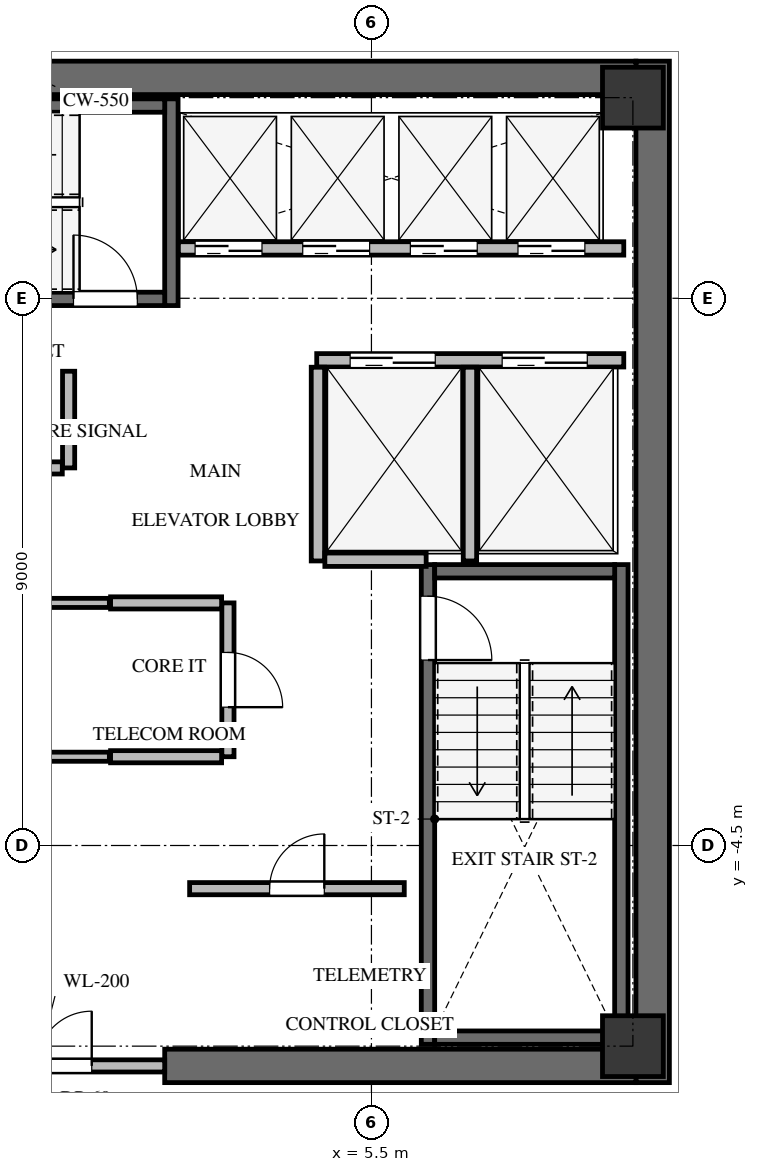
"""IFC4 building model, lengths in metres.
Left out: names, types, materials, properties, quantities, classifications, styles, units other than length and angle.
Written with IfcOpenShell. Run it as: python <this file> out.ifc"""

import sys

from ifc_helpers import new_model, si_unit, direction, frame, frame_2d, origin, origin_2d, place, context, subcontext, project, spatial, rectangle, extrude, source, transform, mapped, element, fill, save


model = new_model("IFC4")
c1 = context("Model", 3, precision=1e-05, world=origin(), true_north=direction((0.0, 1.0)))
c2 = subcontext(c1, "Body", "Model", "MODEL_VIEW")
j1 = project(units=[si_unit("LENGTHUNIT", "METRE"), si_unit("PLANEANGLEUNIT", "RADIAN")], contexts=[c1])
p1 = place(None, origin())
s1 = spatial("IfcSite", under=j1, at=p1, CompositionType="ELEMENT")
p2 = place(p1, origin())
s2 = spatial("IfcBuilding", under=s1, at=p2, CompositionType="ELEMENT")
p3 = place(p2, frame((0.0, 0.0, 248.0)))
s3 = spatial("IfcBuildingStorey", under=s2, at=p3, CompositionType="ELEMENT", Elevation=248.0)
p4 = place(p3, frame((10.125, -8.4, 0.0), z_axis=(0.0, 0.0, 1.0), x_axis=(0.0, 1.0, 0.0)))
e1 = element("IfcWall", 1, at=p4, inside=s3, PredefinedType="SHEAR", context=c2, shape_type="SweptSolid", body=[
    extrude(rectangle(XDim=16.8, YDim=0.55, at=frame_2d((8.4, 0.0))), origin(), (0.0, 0.0, 1.0), 3.3),
])
p5 = place(p3, frame((2.1, -8.125, 0.0), z_axis=(0.0, 0.0, 1.0), x_axis=(1.0, 0.0, 0.0)))
e2 = element("IfcWall", 2, at=p5, inside=s3, PredefinedType="SHEAR", context=c2, shape_type="SweptSolid", body=[
    extrude(rectangle(XDim=7.75, YDim=0.55, at=frame_2d((3.875, 0.0))), origin(), (0.0, 0.0, 1.0), 3.3),
])
p6 = place(p3, frame((-9.85, 8.125, 0.0), z_axis=(0.0, 0.0, 1.0), x_axis=(1.0, 0.0, 0.0)))
e3 = element("IfcWall", 3, at=p6, inside=s3, PredefinedType="SHEAR", context=c2, shape_type="SweptSolid", body=[
    extrude(rectangle(XDim=19.7, YDim=0.55, at=frame_2d((9.85, 0.0))), origin(), (0.0, 0.0, 1.0), 3.3),
])
p7 = place(p3, frame((9.61, -7.77, -0.24), z_axis=(0.0, 0.0, 1.0), x_axis=(0.0, 1.0, 0.0)))
e4 = element("IfcWall", 4, at=p7, inside=s3, PredefinedType="SHEAR", context=c2, shape_type="SweptSolid", body=[
    extrude(rectangle(XDim=7.89, YDim=0.22, at=frame_2d((3.945, 0.0))), origin(), (0.0, 0.0, 1.0), 3.3),
])
p8 = place(p3, frame((6.43, 0.12, -0.24), z_axis=(0.0, 0.0, 1.0), x_axis=(0.0, -1.0, 0.0)))
e5 = element("IfcWall", 5, at=p8, inside=s3, PredefinedType="SHEAR", context=c2, shape_type="SweptSolid", body=[
    extrude(rectangle(XDim=7.89, YDim=0.22, at=frame_2d((3.945, 0.0))), origin(), (0.0, 0.0, 1.0), 3.3),
])
p9 = place(p8, frame((0.52, 0.0, 0.0)))
e6 = element("IfcOpeningElement", 6, at=p9, cuts=e5, PredefinedType="OPENING", context=c2, shape_type="SweptSolid", body=[
    extrude(rectangle(XDim=1.05, YDim=2.15, at=frame_2d((0.525, 1.075))), frame((0.0, 0.12, 0.0), z_axis=(0.0, -1.0, 0.0), x_axis=(1.0, 0.0, 0.0)), (0.0, 0.0, 1.0), 0.24),
])
for number, where, z_axis, x_axis in (
    (7, (6.54, -7.66, -0.24), (0.0, 0.0, 1.0), (1.0, 0.0, 0.0)),
    (8, (9.5, 0.01, -0.24), (0.0, 0.0, 1.0), (-1.0, 0.0, 0.0)),
):
    element("IfcWall", number, at=place(p3, frame(where, z_axis=z_axis, x_axis=x_axis)), inside=s3, PredefinedType="SHEAR", context=c2, shape_type="SweptSolid", body=[
        extrude(rectangle(XDim=2.96, YDim=0.22, at=frame_2d((1.48, 0.0))), origin(), (0.0, 0.0, 1.0), 3.3),
    ])
p10 = place(p3, frame((2.21, 4.38, -0.24), z_axis=(0.0, 0.0, 1.0), x_axis=(0.0, 1.0, 0.0)))
e9 = element("IfcWall", 9, at=p10, inside=s3, PredefinedType="SHEAR", context=c2, shape_type="SweptSolid", body=[
    extrude(rectangle(XDim=3.4, YDim=0.22, at=frame_2d((1.7, 0.0))), origin(), (0.0, 0.0, 1.0), 3.3),
])
p11 = place(p3, frame((-5.25, 4.49, -0.24), z_axis=(0.0, 0.0, 1.0), x_axis=(1.0, 0.0, 0.0)))
e10 = element("IfcWall", 10, at=p11, inside=s3, PredefinedType="SHEAR", context=c2, shape_type="SweptSolid", body=[
    extrude(rectangle(XDim=7.35, YDim=0.22, at=frame_2d((3.675, 0.0))), origin(), (0.0, 0.0, 1.0), 3.3),
])
p12 = place(p11, frame((5.85, 0.0, 0.0)))
e11 = element("IfcOpeningElement", 11, at=p12, cuts=e10, PredefinedType="OPENING", context=c2, shape_type="SweptSolid", body=[
    extrude(rectangle(XDim=1.05, YDim=2.15, at=frame_2d((0.525, 1.075))), frame((0.0, 0.12, 0.0), z_axis=(0.0, -1.0, 0.0), x_axis=(1.0, 0.0, 0.0)), (0.0, 0.0, 1.0), 0.24),
])
p13 = place(p3, frame((2.1, 7.67, -0.24), z_axis=(0.0, 0.0, 1.0), x_axis=(-1.0, 0.0, 0.0)))
e12 = element("IfcWall", 12, at=p13, inside=s3, PredefinedType="SHEAR", context=c2, shape_type="SweptSolid", body=[
    extrude(rectangle(XDim=7.35, YDim=0.22, at=frame_2d((3.675, 0.0))), origin(), (0.0, 0.0, 1.0), 3.3),
])
m1 = source(origin(), c2, "Body", "SweptSolid", [
    extrude(rectangle(XDim=1.0, YDim=1.0, at=origin_2d()), origin(), (0.0, 0.0, 1.0), 3.3),
])
for number, where, z_axis, x_axis in (
    (13, (9.8, -7.8, -0.24), (0.0, 0.0, 1.0), (1.0, 0.0, 0.0)),
    (14, (9.8, 7.8, -0.24), (0.0, 0.0, 1.0), (1.0, 0.0, 0.0)),
):
    element("IfcColumn", number, at=place(p3, frame(where, z_axis=z_axis, x_axis=x_axis)), inside=s3, PredefinedType="COLUMN", context=c2, shape_type="MappedRepresentation", body=[
        mapped(m1, transform((0.0, 0.0, 0.0), x_axis=(1.0, 0.0, 0.0), y_axis=(0.0, 1.0, 0.0), z_axis=(0.0, 0.0, 1.0), scale=1.0)),
    ])
p14 = place(p3, frame((-2.1, -8.125, 0.0), z_axis=(0.0, 0.0, 1.0), x_axis=(1.0, 0.0, 0.0)))
e15 = element("IfcWall", 15, at=p14, inside=s3, PredefinedType="SOLIDWALL", context=c2, shape_type="SweptSolid", body=[
    extrude(rectangle(XDim=4.2, YDim=0.2, at=frame_2d((2.1, 0.0))), origin(), (0.0, 0.0, 1.0), 3.045),
])
p15 = place(p14, frame((1.2, 0.0, 0.0)))
e16 = element("IfcOpeningElement", 16, at=p15, cuts=e15, PredefinedType="OPENING", context=c2, shape_type="SweptSolid", body=[
    extrude(rectangle(XDim=1.8, YDim=2.15, at=frame_2d((0.9, 1.075))), frame((0.0, 0.11, 0.0), z_axis=(0.0, -1.0, 0.0), x_axis=(1.0, 0.0, 0.0)), (0.0, 0.0, 1.0), 0.22),
])
p16 = place(p3, frame((4.6, 3.48, 0.0), z_axis=(0.0, 0.0, 1.0), x_axis=(1.0, 0.0, 0.0)))
e17 = element("IfcWall", 17, at=p16, inside=s3, PredefinedType="SOLIDWALL", context=c2, shape_type="SweptSolid", body=[
    extrude(rectangle(XDim=5.05, YDim=0.22, at=frame_2d((2.525, 0.0))), origin(), (0.0, 0.0, 1.0), 3.045),
])
p17 = place(p16, frame((0.55, 0.0, 0.0)))
e18 = element("IfcOpeningElement", 18, at=p17, cuts=e17, PredefinedType="OPENING", context=c2, shape_type="SweptSolid", body=[
    extrude(rectangle(XDim=1.4, YDim=2.15, at=frame_2d((0.7, 1.075))), frame((0.0, 0.12, 0.0), z_axis=(0.0, -1.0, 0.0), x_axis=(1.0, 0.0, 0.0)), (0.0, 0.0, 1.0), 0.24),
])
p18 = place(p16, frame((3.05, 0.0, 0.0)))
e19 = element("IfcOpeningElement", 19, at=p18, cuts=e17, PredefinedType="OPENING", context=c2, shape_type="SweptSolid", body=[
    extrude(rectangle(XDim=1.4, YDim=2.15, at=frame_2d((0.7, 1.075))), frame((0.0, 0.12, 0.0), z_axis=(0.0, -1.0, 0.0), x_axis=(1.0, 0.0, 0.0)), (0.0, 0.0, 1.0), 0.24),
])
for number, where, z_axis, x_axis in (
    (20, (4.62, 0.18, 0.0), (0.0, 0.0, 1.0), (0.0, 1.0, 0.0)),
    (21, (7.12, 0.18, 0.0), (0.0, 0.0, 1.0), (0.0, 1.0, 0.0)),
):
    element("IfcWall", number, at=place(p3, frame(where, z_axis=z_axis, x_axis=x_axis)), inside=s3, PredefinedType="SOLIDWALL", context=c2, shape_type="SweptSolid", body=[
        extrude(rectangle(XDim=3.186, YDim=0.22, at=frame_2d((1.593, 0.0))), origin(), (0.0, 0.0, 1.0), 3.045),
    ])
p19 = place(p3, frame((4.734, 0.2, 0.0), z_axis=(0.0, 0.0, 1.0), x_axis=(1.0, 0.0, 0.0)))
e22 = element("IfcWall", 22, at=p19, inside=s3, PredefinedType="SOLIDWALL", context=c2, shape_type="SweptSolid", body=[
    extrude(rectangle(XDim=1.666, YDim=0.22, at=frame_2d((0.833, 0.0))), origin(), (0.0, 0.0, 1.0), 3.045),
])
p20 = place(p3, frame((2.325, 5.32, 0.0), z_axis=(0.0, 0.0, 1.0), x_axis=(1.0, 0.0, 0.0)))
e23 = element("IfcWall", 23, at=p20, inside=s3, PredefinedType="SOLIDWALL", context=c2, shape_type="SweptSolid", body=[
    extrude(rectangle(XDim=7.325, YDim=0.22, at=frame_2d((3.663, 0.0))), origin(), (0.0, 0.0, 1.0), 3.045),
])
p21 = place(p20, frame((0.275, 0.0, 0.0)))
e24 = element("IfcOpeningElement", 24, at=p21, cuts=e23, PredefinedType="OPENING", context=c2, shape_type="SweptSolid", body=[
    extrude(rectangle(XDim=1.1, YDim=2.15, at=frame_2d((0.55, 1.075))), frame((0.0, 0.12, 0.0), z_axis=(0.0, -1.0, 0.0), x_axis=(1.0, 0.0, 0.0)), (0.0, 0.0, 1.0), 0.24),
])
p22 = place(p20, frame((2.045, 0.0, 0.0)))
e25 = element("IfcOpeningElement", 25, at=p22, cuts=e23, PredefinedType="OPENING", context=c2, shape_type="SweptSolid", body=[
    extrude(rectangle(XDim=1.1, YDim=2.15, at=frame_2d((0.55, 1.075))), frame((0.0, 0.12, 0.0), z_axis=(0.0, -1.0, 0.0), x_axis=(1.0, 0.0, 0.0)), (0.0, 0.0, 1.0), 0.24),
])
p23 = place(p20, frame((3.815, 0.0, 0.0)))
e26 = element("IfcOpeningElement", 26, at=p23, cuts=e23, PredefinedType="OPENING", context=c2, shape_type="SweptSolid", body=[
    extrude(rectangle(XDim=1.1, YDim=2.15, at=frame_2d((0.55, 1.075))), frame((0.0, 0.12, 0.0), z_axis=(0.0, -1.0, 0.0), x_axis=(1.0, 0.0, 0.0)), (0.0, 0.0, 1.0), 0.24),
])
p24 = place(p20, frame((5.585, 0.0, 0.0)))
e27 = element("IfcOpeningElement", 27, at=p24, cuts=e23, PredefinedType="OPENING", context=c2, shape_type="SweptSolid", body=[
    extrude(rectangle(XDim=1.1, YDim=2.15, at=frame_2d((0.55, 1.075))), frame((0.0, 0.12, 0.0), z_axis=(0.0, -1.0, 0.0), x_axis=(1.0, 0.0, 0.0)), (0.0, 0.0, 1.0), 0.24),
])
p25 = place(p3, frame((2.51, -5.21, 0.0), z_axis=(0.0, 0.0, 1.0), x_axis=(1.0, 0.0, 0.0)))
e28 = element("IfcWall", 28, at=p25, inside=s3, PredefinedType="SOLIDWALL", context=c2, shape_type="SweptSolid", body=[
    extrude(rectangle(XDim=3.53, YDim=0.2, at=frame_2d((1.765, 0.0))), origin(), (0.0, 0.0, 1.0), 3.045),
])
p26 = place(p25, frame((1.315, 0.0, 0.0)))
e29 = element("IfcOpeningElement", 29, at=p26, cuts=e28, PredefinedType="OPENING", context=c2, shape_type="SweptSolid", body=[
    extrude(rectangle(XDim=0.9, YDim=2.05, at=frame_2d((0.45, 1.025))), frame((0.0, 0.11, 0.0), z_axis=(0.0, -1.0, 0.0), x_axis=(1.0, 0.0, 0.0)), (0.0, 0.0, 1.0), 0.22),
])
p27 = place(p3, frame((1.19, -3.04, 0.0), z_axis=(0.0, 0.0, 1.0), x_axis=(-1.0, 0.0, 0.0)))
e30 = element("IfcWall", 30, at=p27, inside=s3, PredefinedType="PARTITIONING", context=c2, shape_type="SweptSolid", body=[
    extrude(rectangle(XDim=5.53, YDim=0.15, at=frame_2d((2.765, 0.0))), origin(), (0.0, 0.0, 1.0), 3.045),
])
p28 = place(p27, frame((2.315, 0.0, 0.0)))
e31 = element("IfcOpeningElement", 31, at=p28, cuts=e30, PredefinedType="OPENING", context=c2, shape_type="SweptSolid", body=[
    extrude(rectangle(XDim=0.9, YDim=2.05, at=frame_2d((0.45, 1.025))), frame((0.0, 0.085, 0.0), z_axis=(0.0, -1.0, 0.0), x_axis=(1.0, 0.0, 0.0)), (0.0, 0.0, 1.0), 0.17),
])
p29 = place(p3, frame((-4.34, -0.51, 0.0), z_axis=(0.0, 0.0, 1.0), x_axis=(1.0, 0.0, 0.0)))
e32 = element("IfcWall", 32, at=p29, inside=s3, PredefinedType="PARTITIONING", context=c2, shape_type="SweptSolid", body=[
    extrude(rectangle(XDim=5.53, YDim=0.15, at=frame_2d((2.765, 0.0))), origin(), (0.0, 0.0, 1.0), 3.045),
])
p30 = place(p3, frame((3.14, -0.51, 0.0), z_axis=(0.0, 0.0, 1.0), x_axis=(0.0, -1.0, 0.0)))
e33 = element("IfcWall", 33, at=p30, inside=s3, PredefinedType="SOLIDWALL", context=c2, shape_type="SweptSolid", body=[
    extrude(rectangle(XDim=2.53, YDim=0.2, at=frame_2d((1.265, 0.0))), origin(), (0.0, 0.0, 1.0), 3.045),
])
p31 = place(p30, frame((0.815, 0.0, 0.0)))
e34 = element("IfcOpeningElement", 34, at=p31, cuts=e33, PredefinedType="OPENING", context=c2, shape_type="SweptSolid", body=[
    extrude(rectangle(XDim=0.9, YDim=2.05, at=frame_2d((0.45, 1.025))), frame((0.0, 0.11, 0.0), z_axis=(0.0, -1.0, 0.0), x_axis=(1.0, 0.0, 0.0)), (0.0, 0.0, 1.0), 0.22),
])
for number, where, z_axis, x_axis in (
    (35, (3.036, -3.04, 0.0), (0.0, 0.0, 1.0), (-1.0, 0.0, 0.0)),
    (36, (1.21, -0.51, 0.0), (0.0, 0.0, 1.0), (1.0, 0.0, 0.0)),
):
    element("IfcWall", number, at=place(p3, frame(where, z_axis=z_axis, x_axis=x_axis)), inside=s3, PredefinedType="SOLIDWALL", context=c2, shape_type="SweptSolid", body=[
        extrude(rectangle(XDim=1.826, YDim=0.2, at=frame_2d((0.913, 0.0))), origin(), (0.0, 0.0, 1.0), 3.045),
    ])
p32 = place(p3, frame((0.52, 3.3, 0.0), z_axis=(0.0, 0.0, 1.0), x_axis=(0.0, -1.0, 0.0)))
e37 = element("IfcWall", 37, at=p32, inside=s3, PredefinedType="SOLIDWALL", context=c2, shape_type="SweptSolid", body=[
    extrude(rectangle(XDim=1.59, YDim=0.2, at=frame_2d((0.795, 0.0))), origin(), (0.0, 0.0, 1.0), 3.045),
])
p33 = place(p3, frame((0.416, 1.71, 0.0), z_axis=(0.0, 0.0, 1.0), x_axis=(-1.0, 0.0, 0.0)))
e38 = element("IfcWall", 38, at=p33, inside=s3, PredefinedType="SOLIDWALL", context=c2, shape_type="SweptSolid", body=[
    extrude(rectangle(XDim=1.336, YDim=0.2, at=frame_2d((0.668, 0.0))), origin(), (0.0, 0.0, 1.0), 3.045),
])
p34 = place(p33, frame((0.218, 0.0, 0.0)))
e39 = element("IfcOpeningElement", 39, at=p34, cuts=e38, PredefinedType="OPENING", context=c2, shape_type="SweptSolid", body=[
    extrude(rectangle(XDim=0.9, YDim=2.05, at=frame_2d((0.45, 1.025))), frame((0.0, 0.11, 0.0), z_axis=(0.0, -1.0, 0.0), x_axis=(1.0, 0.0, 0.0)), (0.0, 0.0, 1.0), 0.22),
])
m2 = source(origin(), c2, "Body", "SweptSolid", [
    extrude(rectangle(XDim=1.05, YDim=2.15, at=frame_2d((0.525, 1.075))), frame((0.0, 0.025, 0.0), z_axis=(0.0, -1.0, 0.0), x_axis=(1.0, 0.0, 0.0)), (0.0, 0.0, 1.0), 0.05),
])
p35 = place(p9, origin())
e40 = element("IfcDoor", 40, at=p35, inside=s3, OperationType="SINGLE_SWING_RIGHT", PredefinedType="DOOR", context=c2, shape_type="MappedRepresentation", body=[
    mapped(m2, transform((0.0, 0.0, 0.0), x_axis=(1.0, 0.0, 0.0), y_axis=(0.0, 1.0, 0.0), z_axis=(0.0, 0.0, 1.0), scale=1.0)),
])
fill(e6, e40)
m3 = source(origin(), c2, "Body", "SweptSolid", [
    extrude(rectangle(XDim=1.05, YDim=2.15, at=frame_2d((0.525, 1.075))), frame((0.0, 0.025, 0.0), z_axis=(0.0, -1.0, 0.0), x_axis=(1.0, 0.0, 0.0)), (0.0, 0.0, 1.0), 0.05),
])
p36 = place(p12, origin())
e41 = element("IfcDoor", 41, at=p36, inside=s3, OperationType="SINGLE_SWING_LEFT", PredefinedType="DOOR", context=c2, shape_type="MappedRepresentation", body=[
    mapped(m3, transform((0.0, 0.0, 0.0), x_axis=(1.0, 0.0, 0.0), y_axis=(0.0, 1.0, 0.0), z_axis=(0.0, 0.0, 1.0), scale=1.0)),
])
fill(e11, e41)
m4 = source(origin(), c2, "Body", "SweptSolid", [
    extrude(rectangle(XDim=1.8, YDim=2.15, at=frame_2d((0.9, 1.075))), frame((0.0, 0.025, 0.0), z_axis=(0.0, -1.0, 0.0), x_axis=(1.0, 0.0, 0.0)), (0.0, 0.0, 1.0), 0.05),
])
p37 = place(p15, origin())
e42 = element("IfcDoor", 42, at=p37, inside=s3, OperationType="DOUBLE_DOOR_SINGLE_SWING", PredefinedType="DOOR", context=c2, shape_type="MappedRepresentation", body=[
    mapped(m4, transform((0.0, 0.0, 0.0), x_axis=(1.0, 0.0, 0.0), y_axis=(0.0, 1.0, 0.0), z_axis=(0.0, 0.0, 1.0), scale=1.0)),
])
fill(e16, e42)
m5 = source(origin(), c2, "Body", "SweptSolid", [
    extrude(rectangle(XDim=1.4, YDim=2.15, at=frame_2d((0.7, 1.075))), frame((0.0, 0.025, 0.0), z_axis=(0.0, -1.0, 0.0), x_axis=(1.0, 0.0, 0.0)), (0.0, 0.0, 1.0), 0.05),
])
p38 = place(p17, origin())
e43 = element("IfcDoor", 43, at=p38, inside=s3, OperationType="DOUBLE_DOOR_SLIDING", PredefinedType="DOOR", context=c2, shape_type="MappedRepresentation", body=[
    mapped(m5, transform((0.0, 0.0, 0.0), x_axis=(1.0, 0.0, 0.0), y_axis=(0.0, 1.0, 0.0), z_axis=(0.0, 0.0, 1.0), scale=1.0)),
])
fill(e18, e43)
p39 = place(p18, origin())
e44 = element("IfcDoor", 44, at=p39, inside=s3, OperationType="DOUBLE_DOOR_SLIDING", PredefinedType="DOOR", context=c2, shape_type="MappedRepresentation", body=[
    mapped(m5, transform((0.0, 0.0, 0.0), x_axis=(1.0, 0.0, 0.0), y_axis=(0.0, 1.0, 0.0), z_axis=(0.0, 0.0, 1.0), scale=1.0)),
])
fill(e19, e44)
m6 = source(origin(), c2, "Body", "SweptSolid", [
    extrude(rectangle(XDim=1.1, YDim=2.15, at=frame_2d((0.55, 1.075))), frame((0.0, 0.025, 0.0), z_axis=(0.0, -1.0, 0.0), x_axis=(1.0, 0.0, 0.0)), (0.0, 0.0, 1.0), 0.05),
])
p40 = place(p21, origin())
e45 = element("IfcDoor", 45, at=p40, inside=s3, OperationType="DOUBLE_DOOR_SLIDING", PredefinedType="DOOR", context=c2, shape_type="MappedRepresentation", body=[
    mapped(m6, transform((0.0, 0.0, 0.0), x_axis=(1.0, 0.0, 0.0), y_axis=(0.0, 1.0, 0.0), z_axis=(0.0, 0.0, 1.0), scale=1.0)),
])
fill(e24, e45)
p41 = place(p22, origin())
e46 = element("IfcDoor", 46, at=p41, inside=s3, OperationType="DOUBLE_DOOR_SLIDING", PredefinedType="DOOR", context=c2, shape_type="MappedRepresentation", body=[
    mapped(m6, transform((0.0, 0.0, 0.0), x_axis=(1.0, 0.0, 0.0), y_axis=(0.0, 1.0, 0.0), z_axis=(0.0, 0.0, 1.0), scale=1.0)),
])
fill(e25, e46)
p42 = place(p23, origin())
e47 = element("IfcDoor", 47, at=p42, inside=s3, OperationType="DOUBLE_DOOR_SLIDING", PredefinedType="DOOR", context=c2, shape_type="MappedRepresentation", body=[
    mapped(m6, transform((0.0, 0.0, 0.0), x_axis=(1.0, 0.0, 0.0), y_axis=(0.0, 1.0, 0.0), z_axis=(0.0, 0.0, 1.0), scale=1.0)),
])
fill(e26, e47)
p43 = place(p24, origin())
e48 = element("IfcDoor", 48, at=p43, inside=s3, OperationType="DOUBLE_DOOR_SLIDING", PredefinedType="DOOR", context=c2, shape_type="MappedRepresentation", body=[
    mapped(m6, transform((0.0, 0.0, 0.0), x_axis=(1.0, 0.0, 0.0), y_axis=(0.0, 1.0, 0.0), z_axis=(0.0, 0.0, 1.0), scale=1.0)),
])
fill(e27, e48)
m7 = source(origin(), c2, "Body", "SweptSolid", [
    extrude(rectangle(XDim=0.9, YDim=2.05, at=frame_2d((0.45, 1.025))), frame((0.0, 0.025, 0.0), z_axis=(0.0, -1.0, 0.0), x_axis=(1.0, 0.0, 0.0)), (0.0, 0.0, 1.0), 0.05),
])
p44 = place(p26, origin())
e49 = element("IfcDoor", 49, at=p44, inside=s3, OperationType="SINGLE_SWING_RIGHT", PredefinedType="DOOR", context=c2, shape_type="MappedRepresentation", body=[
    mapped(m7, transform((0.0, 0.0, 0.0), x_axis=(1.0, 0.0, 0.0), y_axis=(0.0, 1.0, 0.0), z_axis=(0.0, 0.0, 1.0), scale=1.0)),
])
fill(e29, e49)
p45 = place(p31, origin())
e50 = element("IfcDoor", 50, at=p45, inside=s3, OperationType="SINGLE_SWING_RIGHT", PredefinedType="DOOR", context=c2, shape_type="MappedRepresentation", body=[
    mapped(m7, transform((0.0, 0.0, 0.0), x_axis=(1.0, 0.0, 0.0), y_axis=(0.0, 1.0, 0.0), z_axis=(0.0, 0.0, 1.0), scale=1.0)),
])
fill(e34, e50)
save(model, sys.argv[1])
